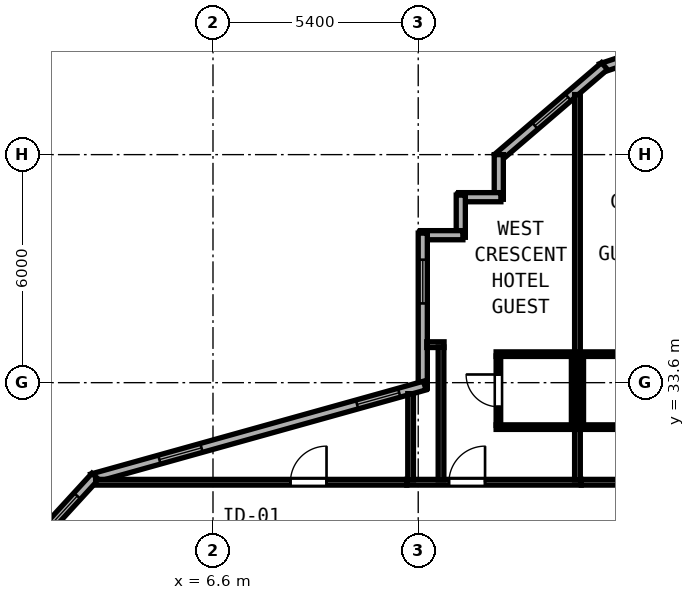
"""IFC4 building model, lengths in metres.
Left out: names, types, materials, properties, quantities, classifications, styles, units other than length and angle.
Written with IfcOpenShell. Run it as: python <this file> out.ifc"""

import sys

from ifc_helpers import new_model, si_unit, direction, frame, frame_2d, origin, place, context, subcontext, project, spatial, rectangle, extrude, element, fill, save


model = new_model("IFC4")
c1 = context("Model", 3, precision=1e-05, world=origin(), true_north=direction((0.0, 1.0)))
c2 = subcontext(c1, "Body", "Model", "MODEL_VIEW")
j1 = project(units=[si_unit("LENGTHUNIT", "METRE"), si_unit("PLANEANGLEUNIT", "RADIAN")], contexts=[c1])
p1 = place(None, origin())
s1 = spatial("IfcSite", under=j1, at=p1, CompositionType="ELEMENT")
p2 = place(p1, origin())
s2 = spatial("IfcBuilding", under=s1, at=p2, CompositionType="ELEMENT")
p3 = place(p2, frame((0.0, 0.0, 152.4)))
s3 = spatial("IfcBuildingStorey", under=s2, at=p3, CompositionType="ELEMENT", Elevation=152.4)
p4 = place(p3, frame((17.858, 42.226, 0.0), z_axis=(0.0, 0.0, 1.0), x_axis=(-0.948639166064, -0.316360131194, 0.0)))
e1 = element("IfcWall", 1, at=p4, inside=s3, PredefinedType="SOLIDWALL", context=c2, shape_type="SweptSolid", body=[
    extrude(rectangle(XDim=1.107, YDim=0.24, at=frame_2d((0.553, 0.0))), origin(), (0.0, 0.0, 1.0), 3.6),
])
p5 = place(p3, frame((16.902, 41.929, 0.0), z_axis=(0.0, 0.0, 1.0), x_axis=(-0.759275136126, -0.650769750112, 0.0)))
e2 = element("IfcWall", 2, at=p5, inside=s3, PredefinedType="SOLIDWALL", context=c2, shape_type="SweptSolid", body=[
    extrude(rectangle(XDim=3.719, YDim=0.24, at=frame_2d((1.86, 0.0))), origin(), (0.0, 0.0, 1.0), 3.6),
])
p6 = place(p5, frame((1.263, 0.0, 0.85)))
e3 = element("IfcOpeningElement", 3, at=p6, cuts=e2, PredefinedType="OPENING", context=c2, shape_type="SweptSolid", body=[
    extrude(rectangle(XDim=1.15, YDim=1.8, at=frame_2d((0.575, 0.9))), frame((0.0, 0.13, 0.0), z_axis=(0.0, -1.0, 0.0), x_axis=(1.0, 0.0, 0.0)), (0.0, 0.0, 1.0), 0.26),
])
p7 = place(p3, frame((14.12, 39.6, 0.0), z_axis=(0.0, 0.0, 1.0), x_axis=(0.0, -1.0, 0.0)))
e4 = element("IfcWall", 4, at=p7, inside=s3, PredefinedType="SOLIDWALL", context=c2, shape_type="SweptSolid", body=[
    extrude(rectangle(XDim=1.175, YDim=0.24, at=frame_2d((0.587, 0.0))), origin(), (0.0, 0.0, 1.0), 3.6),
])
p8 = place(p3, frame((14.175, 38.48, 0.0), z_axis=(0.0, 0.0, 1.0), x_axis=(-1.0, 0.0, 0.0)))
e5 = element("IfcWall", 5, at=p8, inside=s3, PredefinedType="SOLIDWALL", context=c2, shape_type="SweptSolid", body=[
    extrude(rectangle(XDim=1.11, YDim=0.24, at=frame_2d((0.555, 0.0))), origin(), (0.0, 0.0, 1.0), 3.6),
])
p9 = place(p3, frame((13.12, 38.535, 0.0), z_axis=(0.0, 0.0, 1.0), x_axis=(0.0, -1.0, 0.0)))
e6 = element("IfcWall", 6, at=p9, inside=s3, PredefinedType="SOLIDWALL", context=c2, shape_type="SweptSolid", body=[
    extrude(rectangle(XDim=1.11, YDim=0.24, at=frame_2d((0.555, 0.0))), origin(), (0.0, 0.0, 1.0), 3.6),
])
p10 = place(p3, frame((13.175, 37.48, 0.0), z_axis=(0.0, 0.0, 1.0), x_axis=(-1.0, 0.0, 0.0)))
e7 = element("IfcWall", 7, at=p10, inside=s3, PredefinedType="SOLIDWALL", context=c2, shape_type="SweptSolid", body=[
    extrude(rectangle(XDim=1.11, YDim=0.24, at=frame_2d((0.555, 0.0))), origin(), (0.0, 0.0, 1.0), 3.6),
])
p11 = place(p3, frame((12.12, 37.535, 0.0), z_axis=(0.0, 0.0, 1.0), x_axis=(0.0, -1.0, 0.0)))
e8 = element("IfcWall", 8, at=p11, inside=s3, PredefinedType="SOLIDWALL", context=c2, shape_type="SweptSolid", body=[
    extrude(rectangle(XDim=4.081, YDim=0.24, at=frame_2d((2.041, 0.0))), origin(), (0.0, 0.0, 1.0), 3.6),
])
p12 = place(p11, frame((0.7, 0.0, 0.85)))
e9 = element("IfcOpeningElement", 9, at=p12, cuts=e8, PredefinedType="OPENING", context=c2, shape_type="SweptSolid", body=[
    extrude(rectangle(XDim=1.15, YDim=1.8, at=frame_2d((0.575, 0.9))), frame((0.0, 0.13, 0.0), z_axis=(0.0, -1.0, 0.0), x_axis=(1.0, 0.0, 0.0)), (0.0, 0.0, 1.0), 0.26),
])
p13 = place(p3, frame((12.173, 33.524, 0.0), z_axis=(0.0, 0.0, 1.0), x_axis=(-0.963197271032, -0.268795493036, 0.0)))
e10 = element("IfcWall", 10, at=p13, inside=s3, PredefinedType="SOLIDWALL", context=c2, shape_type="SweptSolid", body=[
    extrude(rectangle(XDim=9.095, YDim=0.24, at=frame_2d((4.548, 0.0))), origin(), (0.0, 0.0, 1.0), 3.6),
])
p14 = place(p13, frame((0.7, 0.0, 0.85)))
e11 = element("IfcOpeningElement", 11, at=p14, cuts=e10, PredefinedType="OPENING", context=c2, shape_type="SweptSolid", body=[
    extrude(rectangle(XDim=1.15, YDim=1.8, at=frame_2d((0.575, 0.9))), frame((0.0, 0.13, 0.0), z_axis=(0.0, -1.0, 0.0), x_axis=(1.0, 0.0, 0.0)), (0.0, 0.0, 1.0), 0.26),
])
p15 = place(p13, frame((6.1, 0.0, 0.85)))
e12 = element("IfcOpeningElement", 12, at=p15, cuts=e10, PredefinedType="OPENING", context=c2, shape_type="SweptSolid", body=[
    extrude(rectangle(XDim=1.15, YDim=1.8, at=frame_2d((0.575, 0.9))), frame((0.0, 0.13, 0.0), z_axis=(0.0, -1.0, 0.0), x_axis=(1.0, 0.0, 0.0)), (0.0, 0.0, 1.0), 0.26),
])
p16 = place(p3, frame((3.502, 31.134, 0.0), z_axis=(0.0, 0.0, 1.0), x_axis=(-0.675781844312, -0.737101688302, 0.0)))
e13 = element("IfcWall", 13, at=p16, inside=s3, PredefinedType="SOLIDWALL", context=c2, shape_type="SweptSolid", body=[
    extrude(rectangle(XDim=3.285, YDim=0.24, at=frame_2d((1.642, 0.0))), origin(), (0.0, 0.0, 1.0), 3.6),
])
p17 = place(p16, frame((0.7, 0.0, 0.85)))
e14 = element("IfcOpeningElement", 14, at=p17, cuts=e13, PredefinedType="OPENING", context=c2, shape_type="SweptSolid", body=[
    extrude(rectangle(XDim=1.15, YDim=1.8, at=frame_2d((0.575, 0.9))), frame((0.0, 0.13, 0.0), z_axis=(0.0, -1.0, 0.0), x_axis=(1.0, 0.0, 0.0)), (0.0, 0.0, 1.0), 0.26),
])
p18 = place(p3, frame((11.7, 30.98, 0.0), z_axis=(0.0, 0.0, 1.0), x_axis=(1.0, 0.0, 0.0)))
e15 = element("IfcWall", 15, at=p18, inside=s3, PredefinedType="PARTITIONING", context=c2, shape_type="SweptSolid", body=[
    extrude(rectangle(XDim=4.59, YDim=0.15, at=frame_2d((2.295, 0.0))), origin(), (0.0, 0.0, 1.0), 3.6),
])
p19 = place(p18, frame((1.109, 0.0, 0.0)))
e16 = element("IfcOpeningElement", 16, at=p19, cuts=e15, PredefinedType="OPENING", context=c2, shape_type="SweptSolid", body=[
    extrude(rectangle(XDim=0.95, YDim=2.15, at=frame_2d((0.475, 1.075))), frame((0.0, 0.085, 0.0), z_axis=(0.0, -1.0, 0.0), x_axis=(1.0, 0.0, 0.0)), (0.0, 0.0, 1.0), 0.17),
])
p20 = place(p3, frame((11.8, 31.04, 0.0), z_axis=(0.0, 0.0, 1.0), x_axis=(0.0, 1.0, 0.0)))
e17 = element("IfcWall", 17, at=p20, inside=s3, PredefinedType="PARTITIONING", context=c2, shape_type="SweptSolid", body=[
    extrude(rectangle(XDim=2.271, YDim=0.15, at=frame_2d((1.135, 0.0))), origin(), (0.0, 0.0, 1.0), 3.6),
])
p21 = place(p3, frame((16.19, 31.04, 0.0), z_axis=(0.0, 0.0, 1.0), x_axis=(0.0, 1.0, 0.0)))
e18 = element("IfcWall", 18, at=p21, inside=s3, PredefinedType="PARTITIONING", context=c2, shape_type="SweptSolid", body=[
    extrude(rectangle(XDim=10.141, YDim=0.15, at=frame_2d((5.07, 0.0))), origin(), (0.0, 0.0, 1.0), 3.6),
])
for number, where, z_axis, x_axis in (
    (19, (14.05, 34.35, 0.0), (0.0, 0.0, 1.0), (1.0, 0.0, 0.0)),
    (20, (14.05, 32.43, 0.0), (0.0, 0.0, 1.0), (1.0, 0.0, 0.0)),
):
    element("IfcWall", number, at=place(p3, frame(where, z_axis=z_axis, x_axis=x_axis)), inside=s3, PredefinedType="PARTITIONING", context=c2, shape_type="SweptSolid", body=[
        extrude(rectangle(XDim=2.08, YDim=0.12, at=frame_2d((1.04, 0.0))), origin(), (0.0, 0.0, 1.0), 3.6),
    ])
p22 = place(p3, frame((14.11, 32.475, 0.0), z_axis=(0.0, 0.0, 1.0), x_axis=(0.0, 1.0, 0.0)))
e21 = element("IfcWall", 21, at=p22, inside=s3, PredefinedType="PARTITIONING", context=c2, shape_type="SweptSolid", body=[
    extrude(rectangle(XDim=1.83, YDim=0.12, at=frame_2d((0.915, 0.0))), origin(), (0.0, 0.0, 1.0), 3.6),
])
p23 = place(p22, frame((1.34, 0.0, 0.0), z_axis=(0.0, 0.0, 1.0), x_axis=(-1.0, 0.0, 0.0)))
e22 = element("IfcOpeningElement", 22, at=p23, cuts=e21, PredefinedType="OPENING", context=c2, shape_type="SweptSolid", body=[
    extrude(rectangle(XDim=0.85, YDim=2.1, at=frame_2d((0.425, 1.05))), frame((0.0, 0.07, 0.0), z_axis=(0.0, -1.0, 0.0), x_axis=(1.0, 0.0, 0.0)), (0.0, 0.0, 1.0), 0.14),
])
p24 = place(p3, frame((16.09, 32.475, 0.0), z_axis=(0.0, 0.0, 1.0), x_axis=(0.0, 1.0, 0.0)))
e23 = element("IfcWall", 23, at=p24, inside=s3, PredefinedType="PARTITIONING", context=c2, shape_type="SweptSolid", body=[
    extrude(rectangle(XDim=1.83, YDim=0.12, at=frame_2d((0.915, 0.0))), origin(), (0.0, 0.0, 1.0), 3.6),
])
p25 = place(p3, frame((16.292, 30.98, 0.0), z_axis=(0.0, 0.0, 1.0), x_axis=(1.0, 0.0, 0.0)))
e24 = element("IfcWall", 24, at=p25, inside=s3, PredefinedType="PARTITIONING", context=c2, shape_type="SweptSolid", body=[
    extrude(rectangle(XDim=4.148, YDim=0.15, at=frame_2d((2.074, 0.0))), origin(), (0.0, 0.0, 1.0), 3.6),
])
p26 = place(p25, frame((2.935, 0.0, 0.0)))
e25 = element("IfcOpeningElement", 25, at=p26, cuts=e24, PredefinedType="OPENING", context=c2, shape_type="SweptSolid", body=[
    extrude(rectangle(XDim=0.95, YDim=2.15, at=frame_2d((0.475, 1.075))), frame((0.0, 0.085, 0.0), z_axis=(0.0, -1.0, 0.0), x_axis=(1.0, 0.0, 0.0)), (0.0, 0.0, 1.0), 0.17),
])
for number, where, z_axis, x_axis in (
    (26, (16.25, 34.35, 0.0), (0.0, 0.0, 1.0), (1.0, 0.0, 0.0)),
    (27, (16.25, 32.43, 0.0), (0.0, 0.0, 1.0), (1.0, 0.0, 0.0)),
):
    element("IfcWall", number, at=place(p3, frame(where, z_axis=z_axis, x_axis=x_axis)), inside=s3, PredefinedType="PARTITIONING", context=c2, shape_type="SweptSolid", body=[
        extrude(rectangle(XDim=2.08, YDim=0.12, at=frame_2d((1.04, 0.0))), origin(), (0.0, 0.0, 1.0), 3.6),
    ])
p27 = place(p3, frame((16.29, 32.475, 0.0), z_axis=(0.0, 0.0, 1.0), x_axis=(0.0, 1.0, 0.0)))
e28 = element("IfcWall", 28, at=p27, inside=s3, PredefinedType="PARTITIONING", context=c2, shape_type="SweptSolid", body=[
    extrude(rectangle(XDim=1.83, YDim=0.12, at=frame_2d((0.915, 0.0))), origin(), (0.0, 0.0, 1.0), 3.6),
])
p28 = place(p3, frame((12.225, 34.6, 0.0), z_axis=(0.0, 0.0, 1.0), x_axis=(1.0, 0.0, 0.0)))
e29 = element("IfcWall", 29, at=p28, inside=s3, PredefinedType="PARTITIONING", context=c2, shape_type="SweptSolid", body=[
    extrude(rectangle(XDim=0.455, YDim=0.15, at=frame_2d((0.228, 0.0))), origin(), (0.0, 0.0, 1.0), 3.6),
])
p29 = place(p3, frame((3.512, 30.98, 0.0), z_axis=(0.0, 0.0, 1.0), x_axis=(1.0, 0.0, 0.0)))
e30 = element("IfcWall", 30, at=p29, inside=s3, PredefinedType="PARTITIONING", context=c2, shape_type="SweptSolid", body=[
    extrude(rectangle(XDim=8.186, YDim=0.15, at=frame_2d((4.093, 0.0))), origin(), (0.0, 0.0, 1.0), 3.6),
])
p30 = place(p29, frame((5.125, 0.0, 0.0)))
e31 = element("IfcOpeningElement", 31, at=p30, cuts=e30, PredefinedType="OPENING", context=c2, shape_type="SweptSolid", body=[
    extrude(rectangle(XDim=0.95, YDim=2.12, at=frame_2d((0.475, 1.06))), frame((0.0, 0.085, 0.0), z_axis=(0.0, -1.0, 0.0), x_axis=(1.0, 0.0, 0.0)), (0.0, 0.0, 1.0), 0.17),
])
p31 = place(p3, frame((12.6, 31.04, 0.0), z_axis=(0.0, 0.0, 1.0), x_axis=(0.0, 1.0, 0.0)))
e32 = element("IfcWall", 32, at=p31, inside=s3, PredefinedType="PARTITIONING", context=c2, shape_type="SweptSolid", body=[
    extrude(rectangle(XDim=3.5, YDim=0.15, at=frame_2d((1.75, 0.0))), origin(), (0.0, 0.0, 1.0), 3.6),
])
p32 = place(p6, origin())
e33 = element("IfcWindow", 33, at=p32, inside=s3, PartitioningType="SINGLE_PANEL", PredefinedType="WINDOW", context=c2, shape_type="SweptSolid", body=[
    extrude(rectangle(XDim=1.15, YDim=1.8, at=frame_2d((0.575, 0.9))), frame((0.0, 0.03, 0.0), z_axis=(0.0, -1.0, 0.0), x_axis=(1.0, 0.0, 0.0)), (0.0, 0.0, 1.0), 0.06),
])
fill(e3, e33)
p33 = place(p12, origin())
e34 = element("IfcWindow", 34, at=p33, inside=s3, PartitioningType="SINGLE_PANEL", PredefinedType="WINDOW", context=c2, shape_type="SweptSolid", body=[
    extrude(rectangle(XDim=1.15, YDim=1.8, at=frame_2d((0.575, 0.9))), frame((0.0, 0.03, 0.0), z_axis=(0.0, -1.0, 0.0), x_axis=(1.0, 0.0, 0.0)), (0.0, 0.0, 1.0), 0.06),
])
fill(e9, e34)
p34 = place(p14, origin())
e35 = element("IfcWindow", 35, at=p34, inside=s3, PartitioningType="SINGLE_PANEL", PredefinedType="WINDOW", context=c2, shape_type="SweptSolid", body=[
    extrude(rectangle(XDim=1.15, YDim=1.8, at=frame_2d((0.575, 0.9))), frame((0.0, 0.03, 0.0), z_axis=(0.0, -1.0, 0.0), x_axis=(1.0, 0.0, 0.0)), (0.0, 0.0, 1.0), 0.06),
])
fill(e11, e35)
p35 = place(p15, origin())
e36 = element("IfcWindow", 36, at=p35, inside=s3, PartitioningType="SINGLE_PANEL", PredefinedType="WINDOW", context=c2, shape_type="SweptSolid", body=[
    extrude(rectangle(XDim=1.15, YDim=1.8, at=frame_2d((0.575, 0.9))), frame((0.0, 0.03, 0.0), z_axis=(0.0, -1.0, 0.0), x_axis=(1.0, 0.0, 0.0)), (0.0, 0.0, 1.0), 0.06),
])
fill(e12, e36)
p36 = place(p17, origin())
e37 = element("IfcWindow", 37, at=p36, inside=s3, PartitioningType="SINGLE_PANEL", PredefinedType="WINDOW", context=c2, shape_type="SweptSolid", body=[
    extrude(rectangle(XDim=1.15, YDim=1.8, at=frame_2d((0.575, 0.9))), frame((0.0, 0.03, 0.0), z_axis=(0.0, -1.0, 0.0), x_axis=(1.0, 0.0, 0.0)), (0.0, 0.0, 1.0), 0.06),
])
fill(e14, e37)
p37 = place(p19, origin())
e38 = element("IfcDoor", 38, at=p37, inside=s3, OperationType="SINGLE_SWING_RIGHT", PredefinedType="DOOR", context=c2, shape_type="SweptSolid", body=[
    extrude(rectangle(XDim=0.95, YDim=2.15, at=frame_2d((0.475, 1.075))), frame((0.0, 0.025, 0.0), z_axis=(0.0, -1.0, 0.0), x_axis=(1.0, 0.0, 0.0)), (0.0, 0.0, 1.0), 0.05),
])
fill(e16, e38)
p38 = place(p23, origin())
e39 = element("IfcDoor", 39, at=p38, inside=s3, OperationType="SINGLE_SWING_LEFT", PredefinedType="DOOR", context=c2, shape_type="SweptSolid", body=[
    extrude(rectangle(XDim=0.85, YDim=2.1, at=frame_2d((0.425, 1.05))), frame((0.0, 0.025, 0.0), z_axis=(0.0, -1.0, 0.0), x_axis=(1.0, 0.0, 0.0)), (0.0, 0.0, 1.0), 0.05),
])
fill(e22, e39)
p39 = place(p30, origin())
e40 = element("IfcDoor", 40, at=p39, inside=s3, OperationType="SINGLE_SWING_RIGHT", PredefinedType="DOOR", context=c2, shape_type="SweptSolid", body=[
    extrude(rectangle(XDim=0.95, YDim=2.12, at=frame_2d((0.475, 1.06))), frame((0.0, 0.025, 0.0), z_axis=(0.0, -1.0, 0.0), x_axis=(1.0, 0.0, 0.0)), (0.0, 0.0, 1.0), 0.05),
])
fill(e31, e40)
save(model, sys.argv[1])
